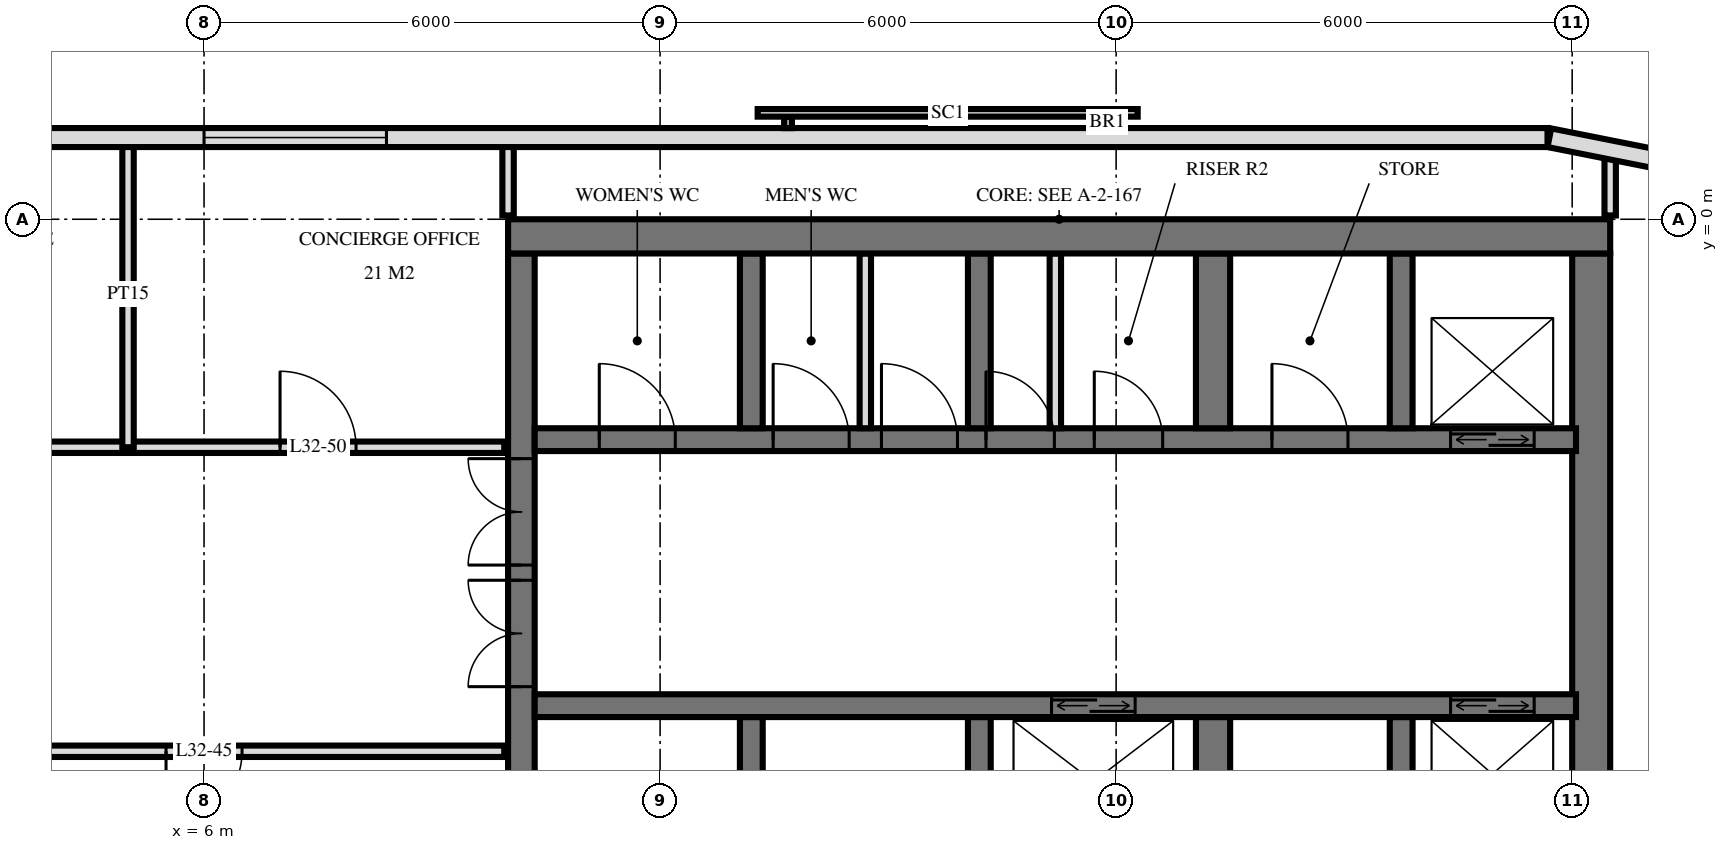
"""IFC4 building model, lengths in metres.
Left out: names, types, materials, properties, quantities, classifications, styles, units other than length and angle.
Written with IfcOpenShell. Run it as: python <this file> out.ifc"""

import sys

from ifc_helpers import new_model, si_unit, direction, frame, frame_2d, origin, place, context, subcontext, project, spatial, rectangle, extrude, element, fill, save


model = new_model("IFC4")
c1 = context("Model", 3, precision=1e-05, world=origin(), true_north=direction((0.0, 1.0)))
c2 = subcontext(c1, "Body", "Model", "MODEL_VIEW")
j1 = project(units=[si_unit("LENGTHUNIT", "METRE"), si_unit("PLANEANGLEUNIT", "RADIAN")], contexts=[c1])
p1 = place(None, origin())
s1 = spatial("IfcSite", under=j1, at=p1, CompositionType="ELEMENT")
p2 = place(p1, origin())
s2 = spatial("IfcBuilding", under=s1, at=p2, CompositionType="ELEMENT")
p3 = place(p2, frame((0.0, 0.0, 127.2)))
s3 = spatial("IfcBuildingStorey", under=s2, at=p3, CompositionType="ELEMENT", Elevation=127.2)
p4 = place(p3, frame((10.0, -0.225, 0.0), z_axis=(0.0, 0.0, 1.0), x_axis=(1.0, 0.0, 0.0)))
e1 = element("IfcWall", 1, at=p4, inside=s3, PredefinedType="SHEAR", context=c2, shape_type="SweptSolid", body=[
    extrude(rectangle(XDim=14.5, YDim=0.45, at=frame_2d((7.25, 0.0))), origin(), (0.0, 0.0, 1.0), 3.6),
])
p5 = place(p3, frame((10.175, -14.55, 0.0), z_axis=(0.0, 0.0, 1.0), x_axis=(0.0, 1.0, 0.0)))
e2 = element("IfcWall", 2, at=p5, inside=s3, PredefinedType="SHEAR", context=c2, shape_type="SweptSolid", body=[
    extrude(rectangle(XDim=14.1, YDim=0.35, at=frame_2d((7.05, 0.0))), origin(), (0.0, 0.0, 1.0), 3.6),
])
p6 = place(p5, frame((8.4, 0.0, 0.0)))
e3 = element("IfcOpeningElement", 3, at=p6, cuts=e2, PredefinedType="OPENING", context=c2, shape_type="SweptSolid", body=[
    extrude(rectangle(XDim=1.4, YDim=2.4, at=frame_2d((0.7, 1.2))), frame((0.0, 0.185, 0.0), z_axis=(0.0, -1.0, 0.0), x_axis=(1.0, 0.0, 0.0)), (0.0, 0.0, 1.0), 0.37),
])
p7 = place(p5, frame((10.0, 0.0, 0.0)))
e4 = element("IfcOpeningElement", 4, at=p7, cuts=e2, PredefinedType="OPENING", context=c2, shape_type="SweptSolid", body=[
    extrude(rectangle(XDim=1.4, YDim=2.4, at=frame_2d((0.7, 1.2))), frame((0.0, 0.185, 0.0), z_axis=(0.0, -1.0, 0.0), x_axis=(1.0, 0.0, 0.0)), (0.0, 0.0, 1.0), 0.37),
])
p8 = place(p5, frame((4.0, 0.0, 0.0)))
e5 = element("IfcOpeningElement", 5, at=p8, cuts=e2, PredefinedType="OPENING", context=c2, shape_type="SweptSolid", body=[
    extrude(rectangle(XDim=1.2, YDim=2.1, at=frame_2d((0.6, 1.05))), frame((0.0, 0.185, 0.0), z_axis=(0.0, -1.0, 0.0), x_axis=(1.0, 0.0, 0.0)), (0.0, 0.0, 1.0), 0.37),
])
p9 = place(p3, frame((24.25, -14.55, 0.0), z_axis=(0.0, 0.0, 1.0), x_axis=(0.0, 1.0, 0.0)))
e6 = element("IfcWall", 6, at=p9, inside=s3, PredefinedType="SHEAR", context=c2, shape_type="SweptSolid", body=[
    extrude(rectangle(XDim=14.1, YDim=0.5, at=frame_2d((7.05, 0.0))), origin(), (0.0, 0.0, 1.0), 3.6),
])
p10 = place(p3, frame((10.35, -2.9, 0.0), z_axis=(0.0, 0.0, 1.0), x_axis=(1.0, 0.0, 0.0)))
e7 = element("IfcWall", 7, at=p10, inside=s3, PredefinedType="SHEAR", context=c2, shape_type="SweptSolid", body=[
    extrude(rectangle(XDim=13.7, YDim=0.3, at=frame_2d((6.85, 0.0))), origin(), (0.0, 0.0, 1.0), 3.6),
])
p11 = place(p10, frame((12.05, 0.0, 0.0)))
e8 = element("IfcOpeningElement", 8, at=p11, cuts=e7, PredefinedType="OPENING", context=c2, shape_type="SweptSolid", body=[
    extrude(rectangle(XDim=1.1, YDim=2.1, at=frame_2d((0.55, 1.05))), frame((0.0, 0.16, 0.0), z_axis=(0.0, -1.0, 0.0), x_axis=(1.0, 0.0, 0.0)), (0.0, 0.0, 1.0), 0.32),
])
p12 = place(p10, frame((5.938, 0.0, 0.0)))
e9 = element("IfcOpeningElement", 9, at=p12, cuts=e7, PredefinedType="OPENING", context=c2, shape_type="SweptSolid", body=[
    extrude(rectangle(XDim=0.9, YDim=2.1, at=frame_2d((0.45, 1.05))), frame((0.0, 0.16, 0.0), z_axis=(0.0, -1.0, 0.0), x_axis=(1.0, 0.0, 0.0)), (0.0, 0.0, 1.0), 0.32),
])
p13 = place(p10, frame((7.363, 0.0, 0.0)))
e10 = element("IfcOpeningElement", 10, at=p13, cuts=e7, PredefinedType="OPENING", context=c2, shape_type="SweptSolid", body=[
    extrude(rectangle(XDim=0.9, YDim=2.1, at=frame_2d((0.45, 1.05))), frame((0.0, 0.16, 0.0), z_axis=(0.0, -1.0, 0.0), x_axis=(1.0, 0.0, 0.0)), (0.0, 0.0, 1.0), 0.32),
])
p14 = place(p10, frame((0.85, 0.0, 0.0)))
e11 = element("IfcOpeningElement", 11, at=p14, cuts=e7, PredefinedType="OPENING", context=c2, shape_type="SweptSolid", body=[
    extrude(rectangle(XDim=1.0, YDim=2.1, at=frame_2d((0.5, 1.05))), frame((0.0, 0.16, 0.0), z_axis=(0.0, -1.0, 0.0), x_axis=(1.0, 0.0, 0.0)), (0.0, 0.0, 1.0), 0.32),
])
p15 = place(p10, frame((3.137, 0.0, 0.0)))
e12 = element("IfcOpeningElement", 12, at=p15, cuts=e7, PredefinedType="OPENING", context=c2, shape_type="SweptSolid", body=[
    extrude(rectangle(XDim=1.0, YDim=2.1, at=frame_2d((0.5, 1.05))), frame((0.0, 0.16, 0.0), z_axis=(0.0, -1.0, 0.0), x_axis=(1.0, 0.0, 0.0)), (0.0, 0.0, 1.0), 0.32),
])
p16 = place(p10, frame((4.562, 0.0, 0.0)))
e13 = element("IfcOpeningElement", 13, at=p16, cuts=e7, PredefinedType="OPENING", context=c2, shape_type="SweptSolid", body=[
    extrude(rectangle(XDim=1.0, YDim=2.1, at=frame_2d((0.5, 1.05))), frame((0.0, 0.16, 0.0), z_axis=(0.0, -1.0, 0.0), x_axis=(1.0, 0.0, 0.0)), (0.0, 0.0, 1.0), 0.32),
])
p17 = place(p10, frame((9.7, 0.0, 0.0)))
e14 = element("IfcOpeningElement", 14, at=p17, cuts=e7, PredefinedType="OPENING", context=c2, shape_type="SweptSolid", body=[
    extrude(rectangle(XDim=1.0, YDim=2.1, at=frame_2d((0.5, 1.05))), frame((0.0, 0.16, 0.0), z_axis=(0.0, -1.0, 0.0), x_axis=(1.0, 0.0, 0.0)), (0.0, 0.0, 1.0), 0.32),
])
p18 = place(p3, frame((10.35, -6.4, 0.0), z_axis=(0.0, 0.0, 1.0), x_axis=(1.0, 0.0, 0.0)))
e15 = element("IfcWall", 15, at=p18, inside=s3, PredefinedType="SHEAR", context=c2, shape_type="SweptSolid", body=[
    extrude(rectangle(XDim=13.7, YDim=0.3, at=frame_2d((6.85, 0.0))), origin(), (0.0, 0.0, 1.0), 3.6),
])
p19 = place(p18, frame((12.05, 0.0, 0.0)))
e16 = element("IfcOpeningElement", 16, at=p19, cuts=e15, PredefinedType="OPENING", context=c2, shape_type="SweptSolid", body=[
    extrude(rectangle(XDim=1.1, YDim=2.1, at=frame_2d((0.55, 1.05))), frame((0.0, 0.16, 0.0), z_axis=(0.0, -1.0, 0.0), x_axis=(1.0, 0.0, 0.0)), (0.0, 0.0, 1.0), 0.32),
])
p20 = place(p18, frame((6.8, 0.0, 0.0)))
e17 = element("IfcOpeningElement", 17, at=p20, cuts=e15, PredefinedType="OPENING", context=c2, shape_type="SweptSolid", body=[
    extrude(rectangle(XDim=1.1, YDim=2.1, at=frame_2d((0.55, 1.05))), frame((0.0, 0.16, 0.0), z_axis=(0.0, -1.0, 0.0), x_axis=(1.0, 0.0, 0.0)), (0.0, 0.0, 1.0), 0.32),
])
for number, where, z_axis, x_axis in (
    (18, (13.2, -2.75, 0.0), (0.0, 0.0, 1.0), (0.0, 1.0, 0.0)),
    (19, (13.2, -8.85, 0.0), (0.0, 0.0, 1.0), (0.0, 1.0, 0.0)),
    (20, (16.2, -2.75, 0.0), (0.0, 0.0, 1.0), (0.0, 1.0, 0.0)),
    (21, (16.2, -8.85, 0.0), (0.0, 0.0, 1.0), (0.0, 1.0, 0.0)),
):
    element("IfcWall", number, at=place(p3, frame(where, z_axis=z_axis, x_axis=x_axis)), inside=s3, PredefinedType="SHEAR", context=c2, shape_type="SweptSolid", body=[
        extrude(rectangle(XDim=2.3, YDim=0.3, at=frame_2d((1.15, 0.0))), origin(), (0.0, 0.0, 1.0), 3.6),
    ])
for number, where, z_axis, x_axis in (
    (22, (19.275, -2.75, 0.0), (0.0, 0.0, 1.0), (0.0, 1.0, 0.0)),
    (23, (19.275, -8.85, 0.0), (0.0, 0.0, 1.0), (0.0, 1.0, 0.0)),
):
    element("IfcWall", number, at=place(p3, frame(where, z_axis=z_axis, x_axis=x_axis)), inside=s3, PredefinedType="SHEAR", context=c2, shape_type="SweptSolid", body=[
        extrude(rectangle(XDim=2.3, YDim=0.45, at=frame_2d((1.15, 0.0))), origin(), (0.0, 0.0, 1.0), 3.6),
    ])
for number, where, z_axis, x_axis in (
    (24, (21.75, -2.75, 0.0), (0.0, 0.0, 1.0), (0.0, 1.0, 0.0)),
    (25, (21.75, -8.85, 0.0), (0.0, 0.0, 1.0), (0.0, 1.0, 0.0)),
):
    element("IfcWall", number, at=place(p3, frame(where, z_axis=z_axis, x_axis=x_axis)), inside=s3, PredefinedType="SHEAR", context=c2, shape_type="SweptSolid", body=[
        extrude(rectangle(XDim=2.3, YDim=0.3, at=frame_2d((1.15, 0.0))), origin(), (0.0, 0.0, 1.0), 3.6),
    ])
p21 = place(p3, frame((25.349, 0.745, 0.0), z_axis=(0.0, 0.0, 1.0), x_axis=(-0.980803419081, 0.194999110559, 0.0)))
e26 = element("IfcWall", 26, at=p21, inside=s3, PredefinedType="SOLIDWALL", context=c2, shape_type="SweptSolid", body=[
    extrude(rectangle(XDim=1.681, YDim=0.25, at=frame_2d((0.841, 0.0))), origin(), (0.0, 0.0, 1.0), 3.32),
])
p22 = place(p3, frame((23.675, 1.075, 0.0), z_axis=(0.0, 0.0, 1.0), x_axis=(-1.0, 0.0, 0.0)))
e27 = element("IfcWall", 27, at=p22, inside=s3, PredefinedType="SOLIDWALL", context=c2, shape_type="SweptSolid", body=[
    extrude(rectangle(XDim=47.351, YDim=0.25, at=frame_2d((23.675, 0.0))), origin(), (0.0, 0.0, 1.0), 3.32),
])
p23 = place(p22, frame((15.275, 0.0, 0.3)))
e28 = element("IfcOpeningElement", 28, at=p23, cuts=e27, PredefinedType="OPENING", context=c2, shape_type="SweptSolid", body=[
    extrude(rectangle(XDim=2.4, YDim=2.1, at=frame_2d((1.2, 1.05))), frame((0.0, 0.135, 0.0), z_axis=(0.0, -1.0, 0.0), x_axis=(1.0, 0.0, 0.0)), (0.0, 0.0, 1.0), 0.27),
])
p24 = place(p22, frame((19.975, 0.0, 0.3)))
e29 = element("IfcOpeningElement", 29, at=p24, cuts=e27, PredefinedType="OPENING", context=c2, shape_type="SweptSolid", body=[
    extrude(rectangle(XDim=2.4, YDim=2.1, at=frame_2d((1.2, 1.05))), frame((0.0, 0.135, 0.0), z_axis=(0.0, -1.0, 0.0), x_axis=(1.0, 0.0, 0.0)), (0.0, 0.0, 1.0), 0.27),
])
for number, where, z_axis, x_axis in (
    (30, (17.2, -2.75, 0.0), (0.0, 0.0, 1.0), (0.0, 1.0, 0.0)),
    (31, (14.7, -2.75, 0.0), (0.0, 0.0, 1.0), (0.0, 1.0, 0.0)),
):
    element("IfcWall", number, at=place(p3, frame(where, z_axis=z_axis, x_axis=x_axis)), inside=s3, PredefinedType="PARTITIONING", context=c2, shape_type="SweptSolid", body=[
        extrude(rectangle(XDim=2.3, YDim=0.15, at=frame_2d((1.15, 0.0))), origin(), (0.0, 0.0, 1.0), 3.3),
    ])
p25 = place(p3, frame((24.5, 0.05, 0.0), z_axis=(0.0, 0.0, 1.0), x_axis=(0.0, 1.0, 0.0)))
e32 = element("IfcWall", 32, at=p25, inside=s3, PredefinedType="PARTITIONING", context=c2, shape_type="SweptSolid", body=[
    extrude(rectangle(XDim=0.807, YDim=0.15, at=frame_2d((0.404, 0.0))), origin(), (0.0, 0.0, 1.0), 3.32),
])
p26 = place(p3, frame((10.0, 0.05, 0.0), z_axis=(0.0, 0.0, 1.0), x_axis=(0.0, 1.0, 0.0)))
e33 = element("IfcWall", 33, at=p26, inside=s3, PredefinedType="PARTITIONING", context=c2, shape_type="SweptSolid", body=[
    extrude(rectangle(XDim=0.97, YDim=0.15, at=frame_2d((0.485, 0.0))), origin(), (0.0, 0.0, 1.0), 3.32),
])
p27 = place(p3, frame((5.0, -3.0, 0.0), z_axis=(0.0, 0.0, 1.0), x_axis=(0.0, 1.0, 0.0)))
e34 = element("IfcWall", 34, at=p27, inside=s3, PredefinedType="PARTITIONING", context=c2, shape_type="SweptSolid", body=[
    extrude(rectangle(XDim=4.02, YDim=0.15, at=frame_2d((2.01, 0.0))), origin(), (0.0, 0.0, 1.0), 3.32),
])
p28 = place(p3, frame((-9.95, -7.0, 0.0), z_axis=(0.0, 0.0, 1.0), x_axis=(1.0, 0.0, 0.0)))
e35 = element("IfcWall", 35, at=p28, inside=s3, PredefinedType="PARTITIONING", context=c2, shape_type="SweptSolid", body=[
    extrude(rectangle(XDim=19.9, YDim=0.15, at=frame_2d((9.95, 0.0))), origin(), (0.0, 0.0, 1.0), 3.32),
])
p29 = place(p28, frame((9.45, 0.0, 0.0)))
e36 = element("IfcOpeningElement", 36, at=p29, cuts=e35, PredefinedType="OPENING", context=c2, shape_type="SweptSolid", body=[
    extrude(rectangle(XDim=1.0, YDim=2.1, at=frame_2d((0.5, 1.05))), frame((0.0, 0.085, 0.0), z_axis=(0.0, -1.0, 0.0), x_axis=(1.0, 0.0, 0.0)), (0.0, 0.0, 1.0), 0.17),
])
p30 = place(p28, frame((15.45, 0.0, 0.0)))
e37 = element("IfcOpeningElement", 37, at=p30, cuts=e35, PredefinedType="OPENING", context=c2, shape_type="SweptSolid", body=[
    extrude(rectangle(XDim=1.0, YDim=2.1, at=frame_2d((0.5, 1.05))), frame((0.0, 0.085, 0.0), z_axis=(0.0, -1.0, 0.0), x_axis=(1.0, 0.0, 0.0)), (0.0, 0.0, 1.0), 0.17),
])
p31 = place(p3, frame((-9.95, -3.0, 0.0), z_axis=(0.0, 0.0, 1.0), x_axis=(1.0, 0.0, 0.0)))
e38 = element("IfcWall", 38, at=p31, inside=s3, PredefinedType="PARTITIONING", context=c2, shape_type="SweptSolid", body=[
    extrude(rectangle(XDim=19.9, YDim=0.15, at=frame_2d((9.95, 0.0))), origin(), (0.0, 0.0, 1.0), 3.32),
])
p32 = place(p31, frame((1.7, 0.0, 0.0)))
e39 = element("IfcOpeningElement", 39, at=p32, cuts=e38, PredefinedType="OPENING", context=c2, shape_type="SweptSolid", body=[
    extrude(rectangle(XDim=1.0, YDim=2.1, at=frame_2d((0.5, 1.05))), frame((0.0, 0.085, 0.0), z_axis=(0.0, -1.0, 0.0), x_axis=(1.0, 0.0, 0.0)), (0.0, 0.0, 1.0), 0.17),
])
p33 = place(p31, frame((5.45, 0.0, 0.0)))
e40 = element("IfcOpeningElement", 40, at=p33, cuts=e38, PredefinedType="OPENING", context=c2, shape_type="SweptSolid", body=[
    extrude(rectangle(XDim=1.0, YDim=2.1, at=frame_2d((0.5, 1.05))), frame((0.0, 0.085, 0.0), z_axis=(0.0, -1.0, 0.0), x_axis=(1.0, 0.0, 0.0)), (0.0, 0.0, 1.0), 0.17),
])
p34 = place(p31, frame((8.2, 0.0, 0.0)))
e41 = element("IfcOpeningElement", 41, at=p34, cuts=e38, PredefinedType="OPENING", context=c2, shape_type="SweptSolid", body=[
    extrude(rectangle(XDim=1.0, YDim=2.1, at=frame_2d((0.5, 1.05))), frame((0.0, 0.085, 0.0), z_axis=(0.0, -1.0, 0.0), x_axis=(1.0, 0.0, 0.0)), (0.0, 0.0, 1.0), 0.17),
])
p35 = place(p31, frame((11.95, 0.0, 0.0)))
e42 = element("IfcOpeningElement", 42, at=p35, cuts=e38, PredefinedType="OPENING", context=c2, shape_type="SweptSolid", body=[
    extrude(rectangle(XDim=1.0, YDim=2.1, at=frame_2d((0.5, 1.05))), frame((0.0, 0.085, 0.0), z_axis=(0.0, -1.0, 0.0), x_axis=(1.0, 0.0, 0.0)), (0.0, 0.0, 1.0), 0.17),
])
p36 = place(p31, frame((16.95, 0.0, 0.0)))
e43 = element("IfcOpeningElement", 43, at=p36, cuts=e38, PredefinedType="OPENING", context=c2, shape_type="SweptSolid", body=[
    extrude(rectangle(XDim=1.0, YDim=2.1, at=frame_2d((0.5, 1.05))), frame((0.0, 0.085, 0.0), z_axis=(0.0, -1.0, 0.0), x_axis=(1.0, 0.0, 0.0)), (0.0, 0.0, 1.0), 0.17),
])
p37 = place(p23, origin())
e44 = element("IfcWindow", 44, at=p37, inside=s3, PartitioningType="SINGLE_PANEL", PredefinedType="WINDOW", context=c2, shape_type="SweptSolid", body=[
    extrude(rectangle(XDim=2.4, YDim=2.1, at=frame_2d((1.2, 1.05))), frame((0.0, 0.03, 0.0), z_axis=(0.0, -1.0, 0.0), x_axis=(1.0, 0.0, 0.0)), (0.0, 0.0, 1.0), 0.06),
])
fill(e28, e44)
p38 = place(p11, origin())
e45 = element("IfcDoor", 45, at=p38, inside=s3, OperationType="DOUBLE_DOOR_SLIDING", PredefinedType="USERDEFINED", context=c2, shape_type="SweptSolid", body=[
    extrude(rectangle(XDim=1.1, YDim=2.1, at=frame_2d((0.55, 1.05))), frame((0.0, 0.025, 0.0), z_axis=(0.0, -1.0, 0.0), x_axis=(1.0, 0.0, 0.0)), (0.0, 0.0, 1.0), 0.05),
])
fill(e8, e45)
p39 = place(p19, origin())
e46 = element("IfcDoor", 46, at=p39, inside=s3, OperationType="DOUBLE_DOOR_SLIDING", PredefinedType="USERDEFINED", context=c2, shape_type="SweptSolid", body=[
    extrude(rectangle(XDim=1.1, YDim=2.1, at=frame_2d((0.55, 1.05))), frame((0.0, 0.025, 0.0), z_axis=(0.0, -1.0, 0.0), x_axis=(1.0, 0.0, 0.0)), (0.0, 0.0, 1.0), 0.05),
])
fill(e16, e46)
p40 = place(p20, origin())
e47 = element("IfcDoor", 47, at=p40, inside=s3, OperationType="DOUBLE_DOOR_SLIDING", PredefinedType="USERDEFINED", context=c2, shape_type="SweptSolid", body=[
    extrude(rectangle(XDim=1.1, YDim=2.1, at=frame_2d((0.55, 1.05))), frame((0.0, 0.025, 0.0), z_axis=(0.0, -1.0, 0.0), x_axis=(1.0, 0.0, 0.0)), (0.0, 0.0, 1.0), 0.05),
])
fill(e17, e47)
p41 = place(p6, origin())
e48 = element("IfcDoor", 48, at=p41, inside=s3, OperationType="DOUBLE_DOOR_SINGLE_SWING", PredefinedType="DOOR", context=c2, shape_type="SweptSolid", body=[
    extrude(rectangle(XDim=1.4, YDim=2.4, at=frame_2d((0.7, 1.2))), frame((0.0, 0.025, 0.0), z_axis=(0.0, -1.0, 0.0), x_axis=(1.0, 0.0, 0.0)), (0.0, 0.0, 1.0), 0.05),
])
fill(e3, e48)
p42 = place(p7, origin())
e49 = element("IfcDoor", 49, at=p42, inside=s3, OperationType="DOUBLE_DOOR_SINGLE_SWING", PredefinedType="DOOR", context=c2, shape_type="SweptSolid", body=[
    extrude(rectangle(XDim=1.4, YDim=2.4, at=frame_2d((0.7, 1.2))), frame((0.0, 0.025, 0.0), z_axis=(0.0, -1.0, 0.0), x_axis=(1.0, 0.0, 0.0)), (0.0, 0.0, 1.0), 0.05),
])
fill(e4, e49)
p43 = place(p12, origin())
e50 = element("IfcDoor", 50, at=p43, inside=s3, OperationType="SINGLE_SWING_RIGHT", PredefinedType="DOOR", context=c2, shape_type="SweptSolid", body=[
    extrude(rectangle(XDim=0.9, YDim=2.1, at=frame_2d((0.45, 1.05))), frame((0.0, 0.025, 0.0), z_axis=(0.0, -1.0, 0.0), x_axis=(1.0, 0.0, 0.0)), (0.0, 0.0, 1.0), 0.05),
])
fill(e9, e50)
p44 = place(p13, origin())
e51 = element("IfcDoor", 51, at=p44, inside=s3, OperationType="SINGLE_SWING_RIGHT", PredefinedType="DOOR", context=c2, shape_type="SweptSolid", body=[
    extrude(rectangle(XDim=0.9, YDim=2.1, at=frame_2d((0.45, 1.05))), frame((0.0, 0.025, 0.0), z_axis=(0.0, -1.0, 0.0), x_axis=(1.0, 0.0, 0.0)), (0.0, 0.0, 1.0), 0.05),
])
fill(e10, e51)
p45 = place(p14, origin())
e52 = element("IfcDoor", 52, at=p45, inside=s3, OperationType="SINGLE_SWING_RIGHT", PredefinedType="DOOR", context=c2, shape_type="SweptSolid", body=[
    extrude(rectangle(XDim=1.0, YDim=2.1, at=frame_2d((0.5, 1.05))), frame((0.0, 0.025, 0.0), z_axis=(0.0, -1.0, 0.0), x_axis=(1.0, 0.0, 0.0)), (0.0, 0.0, 1.0), 0.05),
])
fill(e11, e52)
p46 = place(p15, origin())
e53 = element("IfcDoor", 53, at=p46, inside=s3, OperationType="SINGLE_SWING_RIGHT", PredefinedType="DOOR", context=c2, shape_type="SweptSolid", body=[
    extrude(rectangle(XDim=1.0, YDim=2.1, at=frame_2d((0.5, 1.05))), frame((0.0, 0.025, 0.0), z_axis=(0.0, -1.0, 0.0), x_axis=(1.0, 0.0, 0.0)), (0.0, 0.0, 1.0), 0.05),
])
fill(e12, e53)
p47 = place(p16, origin())
e54 = element("IfcDoor", 54, at=p47, inside=s3, OperationType="SINGLE_SWING_RIGHT", PredefinedType="DOOR", context=c2, shape_type="SweptSolid", body=[
    extrude(rectangle(XDim=1.0, YDim=2.1, at=frame_2d((0.5, 1.05))), frame((0.0, 0.025, 0.0), z_axis=(0.0, -1.0, 0.0), x_axis=(1.0, 0.0, 0.0)), (0.0, 0.0, 1.0), 0.05),
])
fill(e13, e54)
p48 = place(p17, origin())
e55 = element("IfcDoor", 55, at=p48, inside=s3, OperationType="SINGLE_SWING_RIGHT", PredefinedType="DOOR", context=c2, shape_type="SweptSolid", body=[
    extrude(rectangle(XDim=1.0, YDim=2.1, at=frame_2d((0.5, 1.05))), frame((0.0, 0.025, 0.0), z_axis=(0.0, -1.0, 0.0), x_axis=(1.0, 0.0, 0.0)), (0.0, 0.0, 1.0), 0.05),
])
fill(e14, e55)
p49 = place(p30, frame((0.5, 0.0, 0.0), z_axis=(0.0, 0.0, 1.0), x_axis=(-1.0, 0.0, 0.0)))
e56 = element("IfcDoor", 56, at=p49, inside=s3, OperationType="SINGLE_SWING_LEFT", PredefinedType="DOOR", context=c2, shape_type="SweptSolid", body=[
    extrude(rectangle(XDim=1.0, YDim=2.1, at=frame_2d((0.0, 1.05))), frame((0.0, -0.025, 0.0), z_axis=(0.0, 1.0, 0.0), x_axis=(-1.0, 0.0, 0.0)), (0.0, 0.0, 1.0), 0.05),
])
fill(e37, e56)
p50 = place(p36, origin())
e57 = element("IfcDoor", 57, at=p50, inside=s3, OperationType="SINGLE_SWING_RIGHT", PredefinedType="DOOR", context=c2, shape_type="SweptSolid", body=[
    extrude(rectangle(XDim=1.0, YDim=2.1, at=frame_2d((0.5, 1.05))), frame((0.0, 0.025, 0.0), z_axis=(0.0, -1.0, 0.0), x_axis=(1.0, 0.0, 0.0)), (0.0, 0.0, 1.0), 0.05),
])
fill(e43, e57)
save(model, sys.argv[1])
